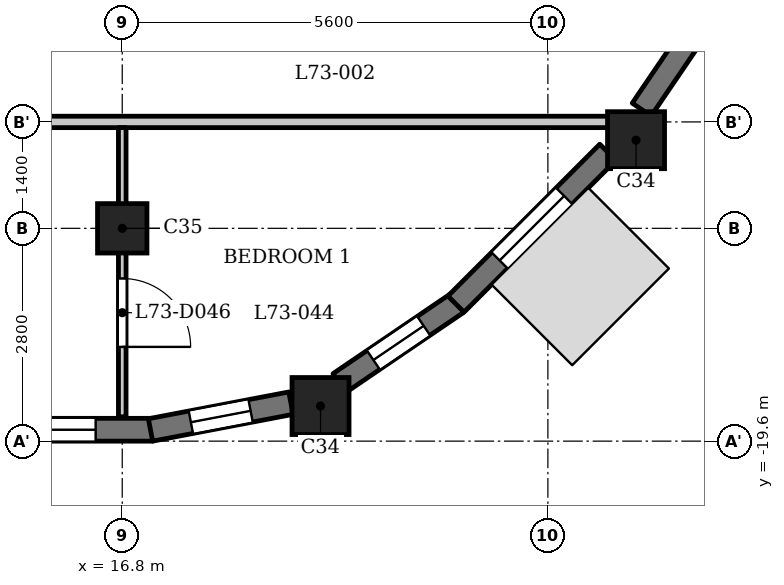
"""IFC4 building model, lengths in metres.
Left out: names, types, materials, properties, quantities, classifications, styles, units other than length and angle.
Written with IfcOpenShell. Run it as: python <this file> out.ifc"""

import sys

from ifc_helpers import new_model, si_unit, direction, frame, frame_2d, origin, origin_2d, place, context, subcontext, project, spatial, rectangle, extrude, element, fill, save


model = new_model("IFC4")
c1 = context("Model", 3, precision=1e-05, world=origin(), true_north=direction((0.0, 1.0)))
c2 = subcontext(c1, "Body", "Model", "MODEL_VIEW")
j1 = project(units=[si_unit("LENGTHUNIT", "METRE"), si_unit("PLANEANGLEUNIT", "RADIAN")], contexts=[c1])
p1 = place(None, origin())
s1 = spatial("IfcSite", under=j1, at=p1, CompositionType="ELEMENT")
p2 = place(p1, origin())
s2 = spatial("IfcBuilding", under=s1, at=p2, CompositionType="ELEMENT")
p3 = place(p2, frame((0.0, 0.0, 280.2)))
s3 = spatial("IfcBuildingStorey", under=s2, at=p3, CompositionType="ELEMENT", Elevation=280.2)
for number, where, z_axis, x_axis in (
    (1, (19.409, -19.138, 0.0), (0.0, 0.0, 1.0), (1.0, 0.0, 0.0)),
    (2, (23.56, -15.64, 0.0), (0.0, 0.0, 1.0), (1.0, 0.0, 0.0)),
):
    element("IfcColumn", number, at=place(p3, frame(where, z_axis=z_axis, x_axis=x_axis)), inside=s3, PredefinedType="COLUMN", context=c2, shape_type="SweptSolid", body=[
        extrude(rectangle(XDim=0.75, YDim=0.75, at=origin_2d()), origin(), (0.0, 0.0, 1.0), 3.5),
    ])
p4 = place(p3, frame((16.8, -16.8, 0.0), z_axis=(0.0, 0.0, 1.0), x_axis=(1.0, 0.0, 0.0)))
e3 = element("IfcColumn", 3, at=p4, inside=s3, PredefinedType="COLUMN", context=c2, shape_type="SweptSolid", body=[
    extrude(rectangle(XDim=0.65, YDim=0.65, at=origin_2d()), origin(), (0.0, 0.0, 1.0), 3.5),
])
p5 = place(p3, frame((14.375, -19.45, 0.0), z_axis=(0.0, 0.0, 1.0), x_axis=(1.0, 0.0, 0.0)))
e4 = element("IfcWall", 4, at=p5, inside=s3, PredefinedType="SOLIDWALL", context=c2, shape_type="SweptSolid", body=[
    extrude(rectangle(XDim=2.825, YDim=0.3, at=frame_2d((1.413, 0.0))), origin(), (0.0, 0.0, 1.0), 2.5),
])
p6 = place(p5, frame((0.275, 0.0, 0.9)))
e5 = element("IfcOpeningElement", 5, at=p6, cuts=e4, PredefinedType="OPENING", context=c2, shape_type="SweptSolid", body=[
    extrude(rectangle(XDim=1.8, YDim=1.25, at=frame_2d((0.9, 0.625))), frame((0.0, 0.16, 0.0), z_axis=(0.0, -1.0, 0.0), x_axis=(1.0, 0.0, 0.0)), (0.0, 0.0, 1.0), 0.32),
])
p7 = place(p3, frame((17.172, -19.453, 0.0), z_axis=(0.0, 0.0, 1.0), x_axis=(0.982284001233, 0.187398348234, 0.0)))
e6 = element("IfcWall", 6, at=p7, inside=s3, PredefinedType="SOLIDWALL", context=c2, shape_type="SweptSolid", body=[
    extrude(rectangle(XDim=1.881, YDim=0.3, at=frame_2d((0.941, 0.0))), origin(), (0.0, 0.0, 1.0), 2.5),
])
p8 = place(p7, frame((0.541, 0.0, 0.6)))
e7 = element("IfcOpeningElement", 7, at=p8, cuts=e6, PredefinedType="OPENING", context=c2, shape_type="SweptSolid", body=[
    extrude(rectangle(XDim=0.8, YDim=1.55, at=frame_2d((0.4, 0.775))), frame((0.0, 0.16, 0.0), z_axis=(0.0, -1.0, 0.0), x_axis=(1.0, 0.0, 0.0)), (0.0, 0.0, 1.0), 0.32),
])
p9 = place(p3, frame((19.657, -18.836, 0.0), z_axis=(0.0, 0.0, 1.0), x_axis=(0.82704477487, 0.562136051469, 0.0)))
e8 = element("IfcWall", 8, at=p9, inside=s3, PredefinedType="SOLIDWALL", context=c2, shape_type="SweptSolid", body=[
    extrude(rectangle(XDim=1.881, YDim=0.3, at=frame_2d((0.94, 0.0))), origin(), (0.0, 0.0, 1.0), 2.5),
])
p10 = place(p9, frame((0.541, 0.0, 0.6)))
e9 = element("IfcOpeningElement", 9, at=p10, cuts=e8, PredefinedType="OPENING", context=c2, shape_type="SweptSolid", body=[
    extrude(rectangle(XDim=0.8, YDim=1.55, at=frame_2d((0.4, 0.775))), frame((0.0, 0.16, 0.0), z_axis=(0.0, -1.0, 0.0), x_axis=(1.0, 0.0, 0.0)), (0.0, 0.0, 1.0), 0.32),
])
p11 = place(p3, frame((21.191, -17.797, 0.0), z_axis=(0.0, 0.0, 1.0), x_axis=(0.707106781187, 0.707106781187, 0.0)))
e10 = element("IfcWall", 10, at=p11, inside=s3, PredefinedType="SOLIDWALL", context=c2, shape_type="SweptSolid", body=[
    extrude(rectangle(XDim=2.825, YDim=0.3, at=frame_2d((1.413, 0.0))), origin(), (0.0, 0.0, 1.0), 2.5),
])
p12 = place(p11, frame((0.812, 0.0, 0.6)))
e11 = element("IfcOpeningElement", 11, at=p12, cuts=e10, PredefinedType="OPENING", context=c2, shape_type="SweptSolid", body=[
    extrude(rectangle(XDim=1.2, YDim=1.55, at=frame_2d((0.6, 0.775))), frame((0.0, 0.16, 0.0), z_axis=(0.0, -1.0, 0.0), x_axis=(1.0, 0.0, 0.0)), (0.0, 0.0, 1.0), 0.32),
])
p13 = place(p3, frame((23.634, -15.237, 0.0), z_axis=(0.0, 0.0, 1.0), x_axis=(0.562099454787, 0.827069648173, 0.0)))
e12 = element("IfcWall", 12, at=p13, inside=s3, PredefinedType="SOLIDWALL", context=c2, shape_type="SweptSolid", body=[
    extrude(rectangle(XDim=1.427, YDim=0.3, at=frame_2d((0.714, 0.0))), origin(), (0.0, 0.0, 1.0), 2.5),
])
p14 = place(p3, frame((-23.322, -15.4, 0.0), z_axis=(0.0, 0.0, 1.0), x_axis=(1.0, 0.0, 0.0)))
e13 = element("IfcWall", 13, at=p14, inside=s3, PredefinedType="PARTITIONING", context=c2, shape_type="SweptSolid", body=[
    extrude(rectangle(XDim=46.872, YDim=0.15, at=frame_2d((23.436, 0.0))), origin(), (0.0, 0.0, 1.0), 3.15),
])
p15 = place(p14, frame((13.772, 0.0, 0.0)))
e14 = element("IfcOpeningElement", 14, at=p15, cuts=e13, PredefinedType="OPENING", context=c2, shape_type="SweptSolid", body=[
    extrude(rectangle(XDim=1.0, YDim=2.1, at=frame_2d((0.5, 1.05))), frame((0.0, 0.085, 0.0), z_axis=(0.0, -1.0, 0.0), x_axis=(1.0, 0.0, 0.0)), (0.0, 0.0, 1.0), 0.17),
])
p16 = place(p14, frame((21.772, 0.0, 0.0)))
e15 = element("IfcOpeningElement", 15, at=p16, cuts=e13, PredefinedType="OPENING", context=c2, shape_type="SweptSolid", body=[
    extrude(rectangle(XDim=1.0, YDim=2.1, at=frame_2d((0.5, 1.05))), frame((0.0, 0.085, 0.0), z_axis=(0.0, -1.0, 0.0), x_axis=(1.0, 0.0, 0.0)), (0.0, 0.0, 1.0), 0.17),
])
p17 = place(p14, frame((31.972, 0.0, 0.0)))
e16 = element("IfcOpeningElement", 16, at=p17, cuts=e13, PredefinedType="OPENING", context=c2, shape_type="SweptSolid", body=[
    extrude(rectangle(XDim=1.0, YDim=2.1, at=frame_2d((0.5, 1.05))), frame((0.0, 0.085, 0.0), z_axis=(0.0, -1.0, 0.0), x_axis=(1.0, 0.0, 0.0)), (0.0, 0.0, 1.0), 0.17),
])
p18 = place(p3, frame((16.8, -19.28, 0.0), z_axis=(0.0, 0.0, 1.0), x_axis=(0.0, 1.0, 0.0)))
e17 = element("IfcWall", 17, at=p18, inside=s3, PredefinedType="PARTITIONING", context=c2, shape_type="SweptSolid", body=[
    extrude(rectangle(XDim=3.805, YDim=0.1, at=frame_2d((1.902, 0.0))), origin(), (0.0, 0.0, 1.0), 3.15),
])
p19 = place(p18, frame((0.92, 0.0, 0.0)))
e18 = element("IfcOpeningElement", 18, at=p19, cuts=e17, PredefinedType="OPENING", context=c2, shape_type="SweptSolid", body=[
    extrude(rectangle(XDim=0.9, YDim=2.1, at=frame_2d((0.45, 1.05))), frame((0.0, 0.06, 0.0), z_axis=(0.0, -1.0, 0.0), x_axis=(1.0, 0.0, 0.0)), (0.0, 0.0, 1.0), 0.12),
])
p20 = place(p19, origin())
e19 = element("IfcDoor", 19, at=p20, inside=s3, OperationType="SINGLE_SWING_LEFT", PredefinedType="DOOR", context=c2, shape_type="SweptSolid", body=[
    extrude(rectangle(XDim=0.9, YDim=2.1, at=frame_2d((0.45, 1.05))), frame((0.0, 0.025, 0.0), z_axis=(0.0, -1.0, 0.0), x_axis=(1.0, 0.0, 0.0)), (0.0, 0.0, 1.0), 0.05),
])
fill(e18, e19)
p21 = place(p6, origin())
e20 = element("IfcWindow", 20, at=p21, inside=s3, PartitioningType="SINGLE_PANEL", PredefinedType="WINDOW", context=c2, shape_type="SweptSolid", body=[
    extrude(rectangle(XDim=1.8, YDim=1.25, at=frame_2d((0.9, 0.625))), frame((0.0, 0.03, 0.0), z_axis=(0.0, -1.0, 0.0), x_axis=(1.0, 0.0, 0.0)), (0.0, 0.0, 1.0), 0.06),
])
fill(e5, e20)
p22 = place(p8, origin())
e21 = element("IfcWindow", 21, at=p22, inside=s3, PartitioningType="SINGLE_PANEL", PredefinedType="WINDOW", context=c2, shape_type="SweptSolid", body=[
    extrude(rectangle(XDim=0.8, YDim=1.55, at=frame_2d((0.4, 0.775))), frame((0.0, 0.03, 0.0), z_axis=(0.0, -1.0, 0.0), x_axis=(1.0, 0.0, 0.0)), (0.0, 0.0, 1.0), 0.06),
])
fill(e7, e21)
p23 = place(p10, origin())
e22 = element("IfcWindow", 22, at=p23, inside=s3, PartitioningType="SINGLE_PANEL", PredefinedType="WINDOW", context=c2, shape_type="SweptSolid", body=[
    extrude(rectangle(XDim=0.8, YDim=1.55, at=frame_2d((0.4, 0.775))), frame((0.0, 0.03, 0.0), z_axis=(0.0, -1.0, 0.0), x_axis=(1.0, 0.0, 0.0)), (0.0, 0.0, 1.0), 0.06),
])
fill(e9, e22)
p24 = place(p12, origin())
e23 = element("IfcWindow", 23, at=p24, inside=s3, PartitioningType="SINGLE_PANEL", PredefinedType="WINDOW", context=c2, shape_type="SweptSolid", body=[
    extrude(rectangle(XDim=1.2, YDim=1.55, at=frame_2d((0.6, 0.775))), frame((0.0, 0.03, 0.0), z_axis=(0.0, -1.0, 0.0), x_axis=(1.0, 0.0, 0.0)), (0.0, 0.0, 1.0), 0.06),
])
fill(e11, e23)
save(model, sys.argv[1])
